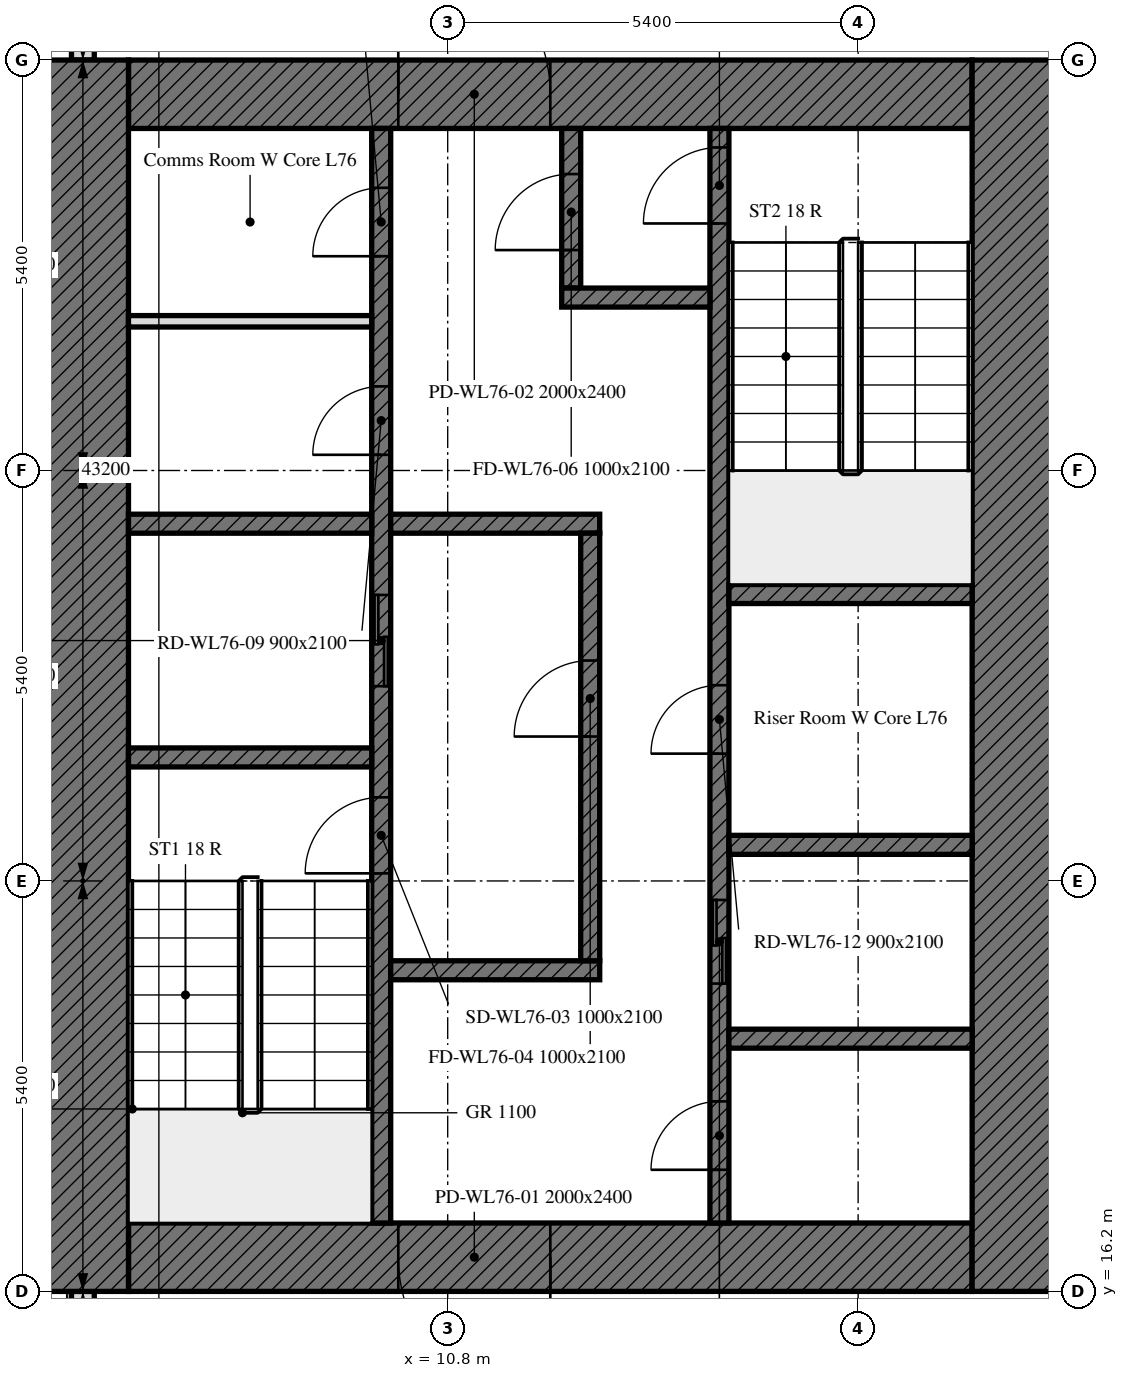
"""IFC4 building model, lengths in metres.
Left out: names, types, materials, properties, quantities, classifications, styles, units other than length and angle.
Written with IfcOpenShell. Run it as: python <this file> out.ifc"""

import sys

from ifc_helpers import new_model, si_unit, direction, frame, frame_2d, origin, place, context, subcontext, project, spatial, rectangle, extrude, element, fill, save


model = new_model("IFC4")
c1 = context("Model", 3, precision=1e-05, world=origin(), true_north=direction((0.0, 1.0)))
c2 = subcontext(c1, "Body", "Model", "MODEL_VIEW")
j1 = project(units=[si_unit("LENGTHUNIT", "METRE"), si_unit("PLANEANGLEUNIT", "RADIAN")], contexts=[c1])
p1 = place(None, origin())
s1 = spatial("IfcSite", under=j1, at=p1, CompositionType="ELEMENT")
p2 = place(p1, origin())
s2 = spatial("IfcBuilding", under=s1, at=p2, CompositionType="ELEMENT")
p3 = place(p2, frame((0.0, 0.0, 304.9)))
s3 = spatial("IfcBuildingStorey", under=s2, at=p3, CompositionType="ELEMENT", Elevation=304.9)
p4 = place(p3, frame((6.0, 43.014, 0.0), z_axis=(0.0, 0.0, 1.0), x_axis=(0.0, -1.0, 0.0)))
e1 = element("IfcWall", 1, at=p4, inside=s3, PredefinedType="SOLIDWALL", context=c2, shape_type="SweptSolid", body=[
    extrude(rectangle(XDim=10.614, YDim=0.3, at=frame_2d((5.307, 0.0))), origin(), (0.0, 0.0, 1.0), 2.8),
])
p5 = place(p4, frame((1.164, 0.0, 0.9)))
e2 = element("IfcOpeningElement", 2, at=p5, cuts=e1, PredefinedType="OPENING", context=c2, shape_type="SweptSolid", body=[
    extrude(rectangle(XDim=1.1, YDim=1.7, at=frame_2d((0.55, 0.85))), frame((0.0, 0.16, 0.0), z_axis=(0.0, -1.0, 0.0), x_axis=(1.0, 0.0, 0.0)), (0.0, 0.0, 1.0), 0.32),
])
p6 = place(p4, frame((2.764, 0.0, 0.9)))
e3 = element("IfcOpeningElement", 3, at=p6, cuts=e1, PredefinedType="OPENING", context=c2, shape_type="SweptSolid", body=[
    extrude(rectangle(XDim=1.1, YDim=1.7, at=frame_2d((0.55, 0.85))), frame((0.0, 0.16, 0.0), z_axis=(0.0, -1.0, 0.0), x_axis=(1.0, 0.0, 0.0)), (0.0, 0.0, 1.0), 0.32),
])
p7 = place(p4, frame((6.564, 0.0, 0.9)))
e4 = element("IfcOpeningElement", 4, at=p7, cuts=e1, PredefinedType="OPENING", context=c2, shape_type="SweptSolid", body=[
    extrude(rectangle(XDim=1.1, YDim=1.7, at=frame_2d((0.55, 0.85))), frame((0.0, 0.16, 0.0), z_axis=(0.0, -1.0, 0.0), x_axis=(1.0, 0.0, 0.0)), (0.0, 0.0, 1.0), 0.32),
])
p8 = place(p4, frame((7.989, 0.0, 0.9)))
e5 = element("IfcOpeningElement", 5, at=p8, cuts=e1, PredefinedType="OPENING", context=c2, shape_type="SweptSolid", body=[
    extrude(rectangle(XDim=0.65, YDim=1.7, at=frame_2d((0.325, 0.85))), frame((0.0, 0.16, 0.0), z_axis=(0.0, -1.0, 0.0), x_axis=(1.0, 0.0, 0.0)), (0.0, 0.0, 1.0), 0.32),
])
p9 = place(p3, frame((6.0, 16.2, 0.0), z_axis=(0.0, 0.0, 1.0), x_axis=(0.0, -1.0, 0.0)))
e6 = element("IfcWall", 6, at=p9, inside=s3, PredefinedType="SOLIDWALL", context=c2, shape_type="SweptSolid", body=[
    extrude(rectangle(XDim=5.214, YDim=0.3, at=frame_2d((2.607, 0.0))), origin(), (0.0, 0.0, 1.0), 2.8),
])
p10 = place(p9, frame((1.975, 0.0, 0.9)))
e7 = element("IfcOpeningElement", 7, at=p10, cuts=e6, PredefinedType="OPENING", context=c2, shape_type="SweptSolid", body=[
    extrude(rectangle(XDim=0.65, YDim=1.7, at=frame_2d((0.325, 0.85))), frame((0.0, 0.16, 0.0), z_axis=(0.0, -1.0, 0.0), x_axis=(1.0, 0.0, 0.0)), (0.0, 0.0, 1.0), 0.32),
])
p11 = place(p9, frame((2.8, 0.0, 0.9)))
e8 = element("IfcOpeningElement", 8, at=p11, cuts=e6, PredefinedType="OPENING", context=c2, shape_type="SweptSolid", body=[
    extrude(rectangle(XDim=1.1, YDim=1.7, at=frame_2d((0.55, 0.85))), frame((0.0, 0.16, 0.0), z_axis=(0.0, -1.0, 0.0), x_axis=(1.0, 0.0, 0.0)), (0.0, 0.0, 1.0), 0.32),
])
p12 = place(p3, frame((17.7, 16.65, 0.0), z_axis=(0.0, 0.0, 1.0), x_axis=(-1.0, 0.0, 0.0)))
e9 = element("IfcWall", 9, at=p12, inside=s3, PredefinedType="SOLIDWALL", context=c2, shape_type="SweptSolid", body=[
    extrude(rectangle(XDim=11.1, YDim=0.9, at=frame_2d((5.55, 0.0))), origin(), (0.0, 0.0, 1.0), 2.8),
])
p13 = place(p12, frame((5.55, 0.0, 0.0)))
e10 = element("IfcOpeningElement", 10, at=p13, cuts=e9, PredefinedType="OPENING", context=c2, shape_type="SweptSolid", body=[
    extrude(rectangle(XDim=2.0, YDim=2.4, at=frame_2d((1.0, 1.2))), frame((0.0, 0.45, 0.0), z_axis=(0.0, -1.0, 0.0), x_axis=(1.0, 0.0, 0.0)), (0.0, 0.0, 1.0), 0.9),
])
p14 = place(p3, frame((6.6, 31.95, 0.0), z_axis=(0.0, 0.0, 1.0), x_axis=(1.0, 0.0, 0.0)))
e11 = element("IfcWall", 11, at=p14, inside=s3, PredefinedType="SOLIDWALL", context=c2, shape_type="SweptSolid", body=[
    extrude(rectangle(XDim=11.1, YDim=0.9, at=frame_2d((5.55, 0.0))), origin(), (0.0, 0.0, 1.0), 2.8),
])
p15 = place(p14, frame((3.55, 0.0, 0.0)))
e12 = element("IfcOpeningElement", 12, at=p15, cuts=e11, PredefinedType="OPENING", context=c2, shape_type="SweptSolid", body=[
    extrude(rectangle(XDim=2.0, YDim=2.4, at=frame_2d((1.0, 1.2))), frame((0.0, 0.45, 0.0), z_axis=(0.0, -1.0, 0.0), x_axis=(1.0, 0.0, 0.0)), (0.0, 0.0, 1.0), 0.9),
])
for number, where, z_axis, x_axis in (
    (13, (6.0, 16.2, 0.0), (0.0, 0.0, 1.0), (0.0, 1.0, 0.0)),
    (14, (18.3, 32.4, 0.0), (0.0, 0.0, 1.0), (0.0, -1.0, 0.0)),
):
    element("IfcWall", number, at=place(p3, frame(where, z_axis=z_axis, x_axis=x_axis)), inside=s3, PredefinedType="SOLIDWALL", context=c2, shape_type="SweptSolid", body=[
        extrude(rectangle(XDim=16.2, YDim=1.2, at=frame_2d((8.1, 0.0))), origin(), (0.0, 0.0, 1.0), 2.8),
    ])
p16 = place(p3, frame((9.925, 17.1, 0.0), z_axis=(0.0, 0.0, 1.0), x_axis=(0.0, 1.0, 0.0)))
e15 = element("IfcWall", 15, at=p16, inside=s3, PredefinedType="SOLIDWALL", context=c2, shape_type="SweptSolid", body=[
    extrude(rectangle(XDim=14.4, YDim=0.25, at=frame_2d((7.2, 0.0))), origin(), (0.0, 0.0, 1.0), 2.8),
])
p17 = place(p16, frame((4.6, 0.0, 0.0)))
e16 = element("IfcOpeningElement", 16, at=p17, cuts=e15, PredefinedType="OPENING", context=c2, shape_type="SweptSolid", body=[
    extrude(rectangle(XDim=1.0, YDim=2.1, at=frame_2d((0.5, 1.05))), frame((0.0, 0.125, 0.0), z_axis=(0.0, -1.0, 0.0), x_axis=(1.0, 0.0, 0.0)), (0.0, 0.0, 1.0), 0.25),
])
p18 = place(p16, frame((7.062, 0.0, 0.0)))
e17 = element("IfcOpeningElement", 17, at=p18, cuts=e15, PredefinedType="OPENING", context=c2, shape_type="SweptSolid", body=[
    extrude(rectangle(XDim=1.2, YDim=2.1, at=frame_2d((0.6, 1.05))), frame((0.0, 0.125, 0.0), z_axis=(0.0, -1.0, 0.0), x_axis=(1.0, 0.0, 0.0)), (0.0, 0.0, 1.0), 0.25),
])
p19 = place(p16, frame((10.106, 0.0, 0.0)))
e18 = element("IfcOpeningElement", 18, at=p19, cuts=e15, PredefinedType="OPENING", context=c2, shape_type="SweptSolid", body=[
    extrude(rectangle(XDim=0.9, YDim=2.1, at=frame_2d((0.45, 1.05))), frame((0.0, 0.125, 0.0), z_axis=(0.0, -1.0, 0.0), x_axis=(1.0, 0.0, 0.0)), (0.0, 0.0, 1.0), 0.25),
])
p20 = place(p16, frame((12.719, 0.0, 0.0)))
e19 = element("IfcOpeningElement", 19, at=p20, cuts=e15, PredefinedType="OPENING", context=c2, shape_type="SweptSolid", body=[
    extrude(rectangle(XDim=0.9, YDim=2.1, at=frame_2d((0.45, 1.05))), frame((0.0, 0.125, 0.0), z_axis=(0.0, -1.0, 0.0), x_axis=(1.0, 0.0, 0.0)), (0.0, 0.0, 1.0), 0.25),
])
p21 = place(p3, frame((14.375, 17.1, 0.0), z_axis=(0.0, 0.0, 1.0), x_axis=(0.0, 1.0, 0.0)))
e20 = element("IfcWall", 20, at=p21, inside=s3, PredefinedType="SOLIDWALL", context=c2, shape_type="SweptSolid", body=[
    extrude(rectangle(XDim=14.4, YDim=0.25, at=frame_2d((7.2, 0.0))), origin(), (0.0, 0.0, 1.0), 2.8),
])
p22 = place(p21, frame((13.15, 0.0, 0.0)))
e21 = element("IfcOpeningElement", 21, at=p22, cuts=e20, PredefinedType="OPENING", context=c2, shape_type="SweptSolid", body=[
    extrude(rectangle(XDim=1.0, YDim=2.1, at=frame_2d((0.5, 1.05))), frame((0.0, 0.125, 0.0), z_axis=(0.0, -1.0, 0.0), x_axis=(1.0, 0.0, 0.0)), (0.0, 0.0, 1.0), 0.25),
])
p23 = place(p21, frame((3.15, 0.0, 0.0)))
e22 = element("IfcOpeningElement", 22, at=p23, cuts=e20, PredefinedType="OPENING", context=c2, shape_type="SweptSolid", body=[
    extrude(rectangle(XDim=1.1, YDim=2.1, at=frame_2d((0.55, 1.05))), frame((0.0, 0.125, 0.0), z_axis=(0.0, -1.0, 0.0), x_axis=(1.0, 0.0, 0.0)), (0.0, 0.0, 1.0), 0.25),
])
p24 = place(p21, frame((0.7, 0.0, 0.0)))
e23 = element("IfcOpeningElement", 23, at=p24, cuts=e20, PredefinedType="OPENING", context=c2, shape_type="SweptSolid", body=[
    extrude(rectangle(XDim=0.9, YDim=2.1, at=frame_2d((0.45, 1.05))), frame((0.0, 0.125, 0.0), z_axis=(0.0, -1.0, 0.0), x_axis=(1.0, 0.0, 0.0)), (0.0, 0.0, 1.0), 0.25),
])
p25 = place(p21, frame((6.175, 0.0, 0.0)))
e24 = element("IfcOpeningElement", 24, at=p25, cuts=e20, PredefinedType="OPENING", context=c2, shape_type="SweptSolid", body=[
    extrude(rectangle(XDim=0.9, YDim=2.1, at=frame_2d((0.45, 1.05))), frame((0.0, 0.125, 0.0), z_axis=(0.0, -1.0, 0.0), x_axis=(1.0, 0.0, 0.0)), (0.0, 0.0, 1.0), 0.25),
])
for number, where, z_axis, x_axis in (
    (25, (6.6, 23.225, 0.0), (0.0, 0.0, 1.0), (1.0, 0.0, 0.0)),
    (26, (14.5, 25.375, 0.0), (0.0, 0.0, 1.0), (1.0, 0.0, 0.0)),
    (27, (14.5, 22.075, 0.0), (0.0, 0.0, 1.0), (1.0, 0.0, 0.0)),
    (28, (6.6, 26.3, 0.0), (0.0, 0.0, 1.0), (1.0, 0.0, 0.0)),
):
    element("IfcWall", number, at=place(p3, frame(where, z_axis=z_axis, x_axis=x_axis)), inside=s3, PredefinedType="SOLIDWALL", context=c2, shape_type="SweptSolid", body=[
        extrude(rectangle(XDim=3.2, YDim=0.25, at=frame_2d((1.6, 0.0))), origin(), (0.0, 0.0, 1.0), 2.8),
    ])
for number, where, z_axis, x_axis in (
    (29, (10.05, 26.3, 0.0), (0.0, 0.0, 1.0), (1.0, 0.0, 0.0)),
    (30, (10.05, 20.425, 0.0), (0.0, 0.0, 1.0), (1.0, 0.0, 0.0)),
):
    element("IfcWall", number, at=place(p3, frame(where, z_axis=z_axis, x_axis=x_axis)), inside=s3, PredefinedType="SOLIDWALL", context=c2, shape_type="SweptSolid", body=[
        extrude(rectangle(XDim=2.75, YDim=0.25, at=frame_2d((1.375, 0.0))), origin(), (0.0, 0.0, 1.0), 2.8),
    ])
p26 = place(p3, frame((12.425, 29.4, 0.0), z_axis=(0.0, 0.0, 1.0), x_axis=(0.0, 1.0, 0.0)))
e31 = element("IfcWall", 31, at=p26, inside=s3, PredefinedType="SOLIDWALL", context=c2, shape_type="SweptSolid", body=[
    extrude(rectangle(XDim=2.1, YDim=0.25, at=frame_2d((1.05, 0.0))), origin(), (0.0, 0.0, 1.0), 2.8),
])
p27 = place(p26, frame((0.5, 0.0, 0.0)))
e32 = element("IfcOpeningElement", 32, at=p27, cuts=e31, PredefinedType="OPENING", context=c2, shape_type="SweptSolid", body=[
    extrude(rectangle(XDim=1.0, YDim=2.1, at=frame_2d((0.5, 1.05))), frame((0.0, 0.125, 0.0), z_axis=(0.0, -1.0, 0.0), x_axis=(1.0, 0.0, 0.0)), (0.0, 0.0, 1.0), 0.25),
])
p28 = place(p3, frame((12.3, 29.275, 0.0), z_axis=(0.0, 0.0, 1.0), x_axis=(1.0, 0.0, 0.0)))
e33 = element("IfcWall", 33, at=p28, inside=s3, PredefinedType="SOLIDWALL", context=c2, shape_type="SweptSolid", body=[
    extrude(rectangle(XDim=1.95, YDim=0.25, at=frame_2d((0.975, 0.0))), origin(), (0.0, 0.0, 1.0), 2.8),
])
p29 = place(p3, frame((12.675, 20.55, 0.0), z_axis=(0.0, 0.0, 1.0), x_axis=(0.0, 1.0, 0.0)))
e34 = element("IfcWall", 34, at=p29, inside=s3, PredefinedType="SOLIDWALL", context=c2, shape_type="SweptSolid", body=[
    extrude(rectangle(XDim=5.625, YDim=0.25, at=frame_2d((2.812, 0.0))), origin(), (0.0, 0.0, 1.0), 2.8),
])
p30 = place(p29, frame((2.95, 0.0, 0.0)))
e35 = element("IfcOpeningElement", 35, at=p30, cuts=e34, PredefinedType="OPENING", context=c2, shape_type="SweptSolid", body=[
    extrude(rectangle(XDim=1.0, YDim=2.1, at=frame_2d((0.5, 1.05))), frame((0.0, 0.125, 0.0), z_axis=(0.0, -1.0, 0.0), x_axis=(1.0, 0.0, 0.0)), (0.0, 0.0, 1.0), 0.25),
])
p31 = place(p3, frame((14.5, 19.525, 0.0), z_axis=(0.0, 0.0, 1.0), x_axis=(1.0, 0.0, 0.0)))
e36 = element("IfcWall", 36, at=p31, inside=s3, PredefinedType="SOLIDWALL", context=c2, shape_type="SweptSolid", body=[
    extrude(rectangle(XDim=3.2, YDim=0.25, at=frame_2d((1.6, 0.0))), origin(), (0.0, 0.0, 1.0), 2.8),
])
p32 = place(p3, frame((6.6, 28.963, 0.0), z_axis=(0.0, 0.0, 1.0), x_axis=(1.0, 0.0, 0.0)))
e37 = element("IfcWall", 37, at=p32, inside=s3, PredefinedType="PARTITIONING", context=c2, shape_type="SweptSolid", body=[
    extrude(rectangle(XDim=3.2, YDim=0.15, at=frame_2d((1.6, 0.0))), origin(), (0.0, 0.0, 1.0), 2.8),
])
p33 = place(p13, origin())
e38 = element("IfcDoor", 38, at=p33, inside=s3, OperationType="DOUBLE_DOOR_SINGLE_SWING", PredefinedType="DOOR", context=c2, shape_type="SweptSolid", body=[
    extrude(rectangle(XDim=2.0, YDim=2.4, at=frame_2d((1.0, 1.2))), frame((0.0, 0.025, 0.0), z_axis=(0.0, -1.0, 0.0), x_axis=(1.0, 0.0, 0.0)), (0.0, 0.0, 1.0), 0.05),
])
fill(e10, e38)
p34 = place(p15, origin())
e39 = element("IfcDoor", 39, at=p34, inside=s3, OperationType="DOUBLE_DOOR_SINGLE_SWING", PredefinedType="DOOR", context=c2, shape_type="SweptSolid", body=[
    extrude(rectangle(XDim=2.0, YDim=2.4, at=frame_2d((1.0, 1.2))), frame((0.0, 0.025, 0.0), z_axis=(0.0, -1.0, 0.0), x_axis=(1.0, 0.0, 0.0)), (0.0, 0.0, 1.0), 0.05),
])
fill(e12, e39)
p35 = place(p17, origin())
e40 = element("IfcDoor", 40, at=p35, inside=s3, OperationType="SINGLE_SWING_LEFT", PredefinedType="DOOR", context=c2, shape_type="SweptSolid", body=[
    extrude(rectangle(XDim=1.0, YDim=2.1, at=frame_2d((0.5, 1.05))), frame((0.0, 0.025, 0.0), z_axis=(0.0, -1.0, 0.0), x_axis=(1.0, 0.0, 0.0)), (0.0, 0.0, 1.0), 0.05),
])
fill(e16, e40)
p36 = place(p30, origin())
e41 = element("IfcDoor", 41, at=p36, inside=s3, OperationType="SINGLE_SWING_LEFT", PredefinedType="DOOR", context=c2, shape_type="SweptSolid", body=[
    extrude(rectangle(XDim=1.0, YDim=2.1, at=frame_2d((0.5, 1.05))), frame((0.0, 0.025, 0.0), z_axis=(0.0, -1.0, 0.0), x_axis=(1.0, 0.0, 0.0)), (0.0, 0.0, 1.0), 0.05),
])
fill(e35, e41)
p37 = place(p22, origin())
e42 = element("IfcDoor", 42, at=p37, inside=s3, OperationType="SINGLE_SWING_LEFT", PredefinedType="DOOR", context=c2, shape_type="SweptSolid", body=[
    extrude(rectangle(XDim=1.0, YDim=2.1, at=frame_2d((0.5, 1.05))), frame((0.0, 0.025, 0.0), z_axis=(0.0, -1.0, 0.0), x_axis=(1.0, 0.0, 0.0)), (0.0, 0.0, 1.0), 0.05),
])
fill(e21, e42)
p38 = place(p27, origin())
e43 = element("IfcDoor", 43, at=p38, inside=s3, OperationType="SINGLE_SWING_LEFT", PredefinedType="DOOR", context=c2, shape_type="SweptSolid", body=[
    extrude(rectangle(XDim=1.0, YDim=2.1, at=frame_2d((0.5, 1.05))), frame((0.0, 0.025, 0.0), z_axis=(0.0, -1.0, 0.0), x_axis=(1.0, 0.0, 0.0)), (0.0, 0.0, 1.0), 0.05),
])
fill(e32, e43)
p39 = place(p18, origin())
e44 = element("IfcDoor", 44, at=p39, inside=s3, OperationType="DOUBLE_DOOR_SLIDING", PredefinedType="DOOR", context=c2, shape_type="SweptSolid", body=[
    extrude(rectangle(XDim=1.2, YDim=2.1, at=frame_2d((0.6, 1.05))), frame((0.0, 0.025, 0.0), z_axis=(0.0, -1.0, 0.0), x_axis=(1.0, 0.0, 0.0)), (0.0, 0.0, 1.0), 0.05),
])
fill(e17, e44)
p40 = place(p23, origin())
e45 = element("IfcDoor", 45, at=p40, inside=s3, OperationType="DOUBLE_DOOR_SLIDING", PredefinedType="DOOR", context=c2, shape_type="SweptSolid", body=[
    extrude(rectangle(XDim=1.1, YDim=2.1, at=frame_2d((0.55, 1.05))), frame((0.0, 0.025, 0.0), z_axis=(0.0, -1.0, 0.0), x_axis=(1.0, 0.0, 0.0)), (0.0, 0.0, 1.0), 0.05),
])
fill(e22, e45)
p41 = place(p19, origin())
e46 = element("IfcDoor", 46, at=p41, inside=s3, OperationType="SINGLE_SWING_LEFT", PredefinedType="DOOR", context=c2, shape_type="SweptSolid", body=[
    extrude(rectangle(XDim=0.9, YDim=2.1, at=frame_2d((0.45, 1.05))), frame((0.0, 0.025, 0.0), z_axis=(0.0, -1.0, 0.0), x_axis=(1.0, 0.0, 0.0)), (0.0, 0.0, 1.0), 0.05),
])
fill(e18, e46)
p42 = place(p20, origin())
e47 = element("IfcDoor", 47, at=p42, inside=s3, OperationType="SINGLE_SWING_LEFT", PredefinedType="DOOR", context=c2, shape_type="SweptSolid", body=[
    extrude(rectangle(XDim=0.9, YDim=2.1, at=frame_2d((0.45, 1.05))), frame((0.0, 0.025, 0.0), z_axis=(0.0, -1.0, 0.0), x_axis=(1.0, 0.0, 0.0)), (0.0, 0.0, 1.0), 0.05),
])
fill(e19, e47)
p43 = place(p24, origin())
e48 = element("IfcDoor", 48, at=p43, inside=s3, OperationType="SINGLE_SWING_LEFT", PredefinedType="DOOR", context=c2, shape_type="SweptSolid", body=[
    extrude(rectangle(XDim=0.9, YDim=2.1, at=frame_2d((0.45, 1.05))), frame((0.0, 0.025, 0.0), z_axis=(0.0, -1.0, 0.0), x_axis=(1.0, 0.0, 0.0)), (0.0, 0.0, 1.0), 0.05),
])
fill(e23, e48)
p44 = place(p25, origin())
e49 = element("IfcDoor", 49, at=p44, inside=s3, OperationType="SINGLE_SWING_LEFT", PredefinedType="DOOR", context=c2, shape_type="SweptSolid", body=[
    extrude(rectangle(XDim=0.9, YDim=2.1, at=frame_2d((0.45, 1.05))), frame((0.0, 0.025, 0.0), z_axis=(0.0, -1.0, 0.0), x_axis=(1.0, 0.0, 0.0)), (0.0, 0.0, 1.0), 0.05),
])
fill(e24, e49)
save(model, sys.argv[1])
